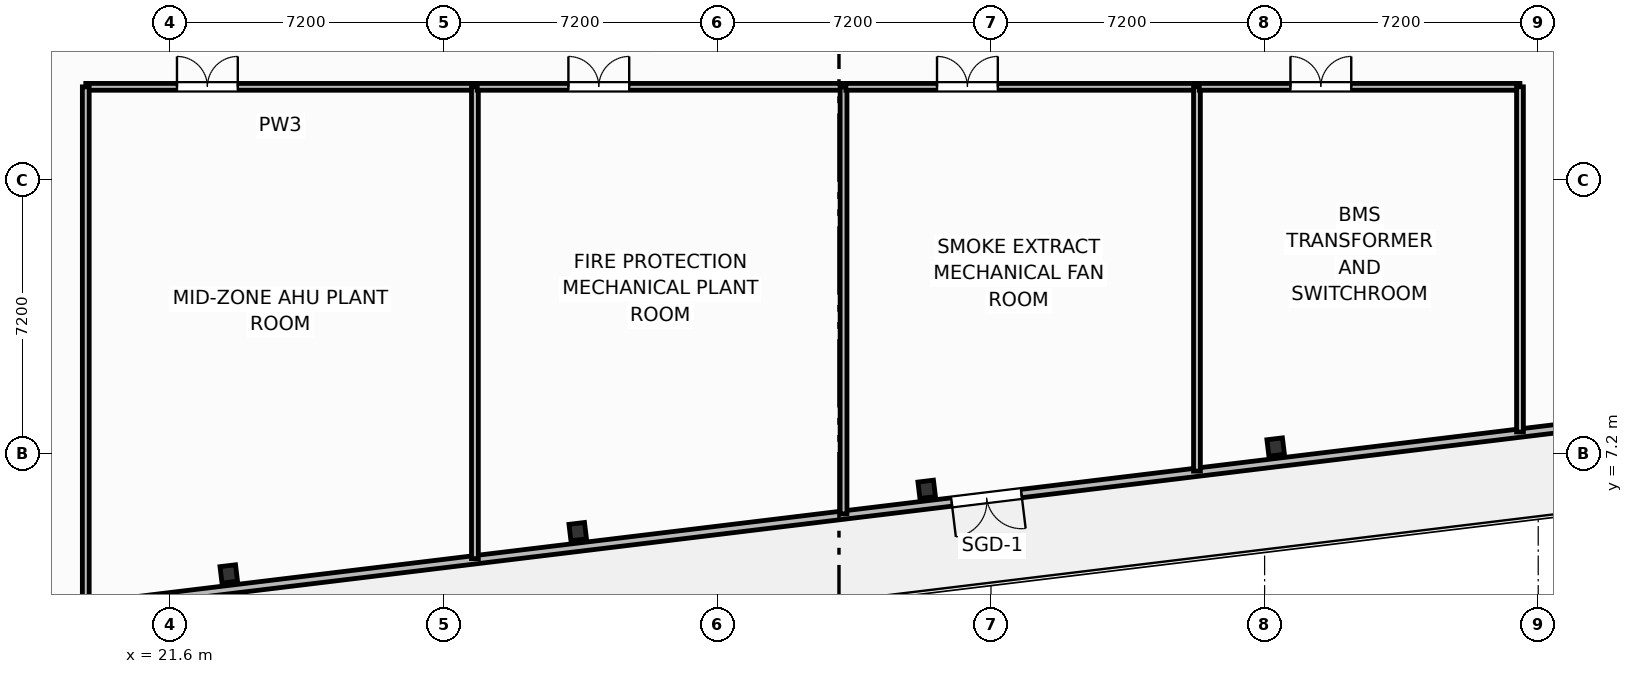
"""IFC4 building model, lengths in metres.
Left out: names, types, materials, properties, quantities, classifications, styles, units other than length and angle.
Written with IfcOpenShell. Run it as: python <this file> out.ifc"""

import sys

from ifc_helpers import new_model, si_unit, direction, frame, frame_2d, origin, origin_2d, place, context, subcontext, project, spatial, rectangle, i_section, extrude, element, fill, save


model = new_model("IFC4")
c1 = context("Model", 3, precision=1e-05, world=origin(), true_north=direction((0.0, 1.0)))
c2 = subcontext(c1, "Body", "Model", "MODEL_VIEW")
j1 = project(units=[si_unit("LENGTHUNIT", "METRE"), si_unit("PLANEANGLEUNIT", "RADIAN")], contexts=[c1])
p1 = place(None, origin())
s1 = spatial("IfcSite", under=j1, at=p1, CompositionType="ELEMENT")
p2 = place(p1, origin())
s2 = spatial("IfcBuilding", under=s1, at=p2, CompositionType="ELEMENT")
p3 = place(p2, frame((0.0, 0.0, 162.4)))
s3 = spatial("IfcBuildingStorey", under=s2, at=p3, CompositionType="ELEMENT", Elevation=162.4)
for number, where, z_axis, x_axis in (
    (1, (23.143, 4.033, -0.32), (0.0, 0.0, 1.0), (0.993, 0.12, 0.0)),
    (2, (32.325, 5.146, -0.32), (0.0, 0.0, 1.0), (0.993, 0.12, 0.0)),
    (3, (41.508, 6.26, -0.32), (0.0, 0.0, 1.0), (0.993, 0.12, 0.0)),
    (4, (50.691, 7.373, -0.32), (0.0, 0.0, 1.0), (0.993, 0.12, 0.0)),
):
    element("IfcColumn", number, at=place(p3, frame(where, z_axis=z_axis, x_axis=x_axis)), inside=s3, PredefinedType="COLUMN", context=c2, shape_type="SweptSolid", body=[
        extrude(i_section(OverallWidth=0.412, OverallDepth=0.435, WebThickness=0.036, FlangeThickness=0.057, FilletRadius=0.025, at=origin_2d()), origin(), (0.0, 0.0, 1.0), 5.12),
    ])
p4 = place(p3, frame((69.453, 9.234, 0.0), z_axis=(0.0, 0.0, 1.0), x_axis=(-0.99273203641, -0.120345768043, 0.0)))
e5 = element("IfcWall", 5, at=p4, inside=s3, PredefinedType="SOLIDWALL", context=c2, shape_type="SweptSolid", body=[
    extrude(rectangle(XDim=56.2, YDim=0.22, at=frame_2d((28.1, 0.0))), origin(), (0.0, 0.0, 1.0), 3.83),
])
p5 = place(p4, frame((25.639, 0.0, 0.0)))
e6 = element("IfcOpeningElement", 6, at=p5, cuts=e5, PredefinedType="OPENING", context=c2, shape_type="SweptSolid", body=[
    extrude(rectangle(XDim=1.85, YDim=2.3, at=frame_2d((0.925, 1.15))), frame((0.0, 0.12, 0.0), z_axis=(0.0, -1.0, 0.0), x_axis=(1.0, 0.0, 0.0)), (0.0, 0.0, 1.0), 0.24),
])
p6 = place(p4, frame((0.55, 0.0, 0.75)))
e7 = element("IfcOpeningElement", 7, at=p6, cuts=e5, PredefinedType="OPENING", context=c2, shape_type="SweptSolid", body=[
    extrude(rectangle(XDim=1.65, YDim=1.65, at=frame_2d((0.825, 0.825))), frame((0.0, 0.12, 0.0), z_axis=(0.0, -1.0, 0.0), x_axis=(1.0, 0.0, 0.0)), (0.0, 0.0, 1.0), 0.24),
])
p7 = place(p4, frame((54.0, 0.0, 0.75)))
e8 = element("IfcOpeningElement", 8, at=p7, cuts=e5, PredefinedType="OPENING", context=c2, shape_type="SweptSolid", body=[
    extrude(rectangle(XDim=1.65, YDim=1.65, at=frame_2d((0.825, 0.825))), frame((0.0, 0.12, 0.0), z_axis=(0.0, -1.0, 0.0), x_axis=(1.0, 0.0, 0.0)), (0.0, 0.0, 1.0), 0.24),
])
p8 = place(p3, frame((19.38, 16.85, 0.0), z_axis=(0.0, 0.0, 1.0), x_axis=(1.0, 0.0, 0.0)))
e9 = element("IfcWall", 9, at=p8, inside=s3, PredefinedType="PARTITIONING", context=c2, shape_type="SweptSolid", body=[
    extrude(rectangle(XDim=10.24, YDim=0.18, at=frame_2d((5.12, 0.0))), origin(), (0.0, 0.0, 1.0), 4.55),
])
p9 = place(p8, frame((2.4, 0.0, 0.0)))
e10 = element("IfcOpeningElement", 10, at=p9, cuts=e9, PredefinedType="OPENING", context=c2, shape_type="SweptSolid", body=[
    extrude(rectangle(XDim=1.6, YDim=2.05, at=frame_2d((0.8, 1.025))), frame((0.0, 0.1, 0.0), z_axis=(0.0, -1.0, 0.0), x_axis=(1.0, 0.0, 0.0)), (0.0, 0.0, 1.0), 0.2),
])
p10 = place(p3, frame((29.62, 4.436, 0.0), z_axis=(0.0, 0.0, 1.0), x_axis=(0.0, 1.0, 0.0)))
e11 = element("IfcWall", 11, at=p10, inside=s3, PredefinedType="PARTITIONING", context=c2, shape_type="SweptSolid", body=[
    extrude(rectangle(XDim=12.415, YDim=0.18, at=frame_2d((6.207, 0.0))), origin(), (0.0, 0.0, 1.0), 4.55),
])
p11 = place(p3, frame((19.38, 3.194, 0.0), z_axis=(0.0, 0.0, 1.0), x_axis=(0.0, 1.0, 0.0)))
e12 = element("IfcWall", 12, at=p11, inside=s3, PredefinedType="PARTITIONING", context=c2, shape_type="SweptSolid", body=[
    extrude(rectangle(XDim=13.656, YDim=0.18, at=frame_2d((6.828, 0.0))), origin(), (0.0, 0.0, 1.0), 4.55),
])
p12 = place(p3, frame((29.68, 16.85, 0.0), z_axis=(0.0, 0.0, 1.0), x_axis=(1.0, 0.0, 0.0)))
e13 = element("IfcWall", 13, at=p12, inside=s3, PredefinedType="PARTITIONING", context=c2, shape_type="SweptSolid", body=[
    extrude(rectangle(XDim=9.64, YDim=0.18, at=frame_2d((4.82, 0.0))), origin(), (0.0, 0.0, 1.0), 4.55),
])
p13 = place(p12, frame((2.4, 0.0, 0.0)))
e14 = element("IfcOpeningElement", 14, at=p13, cuts=e13, PredefinedType="OPENING", context=c2, shape_type="SweptSolid", body=[
    extrude(rectangle(XDim=1.6, YDim=2.05, at=frame_2d((0.8, 1.025))), frame((0.0, 0.1, 0.0), z_axis=(0.0, -1.0, 0.0), x_axis=(1.0, 0.0, 0.0)), (0.0, 0.0, 1.0), 0.2),
])
p14 = place(p3, frame((39.32, 5.611, 0.0), z_axis=(0.0, 0.0, 1.0), x_axis=(0.0, 1.0, 0.0)))
e15 = element("IfcWall", 15, at=p14, inside=s3, PredefinedType="PARTITIONING", context=c2, shape_type="SweptSolid", body=[
    extrude(rectangle(XDim=11.239, YDim=0.18, at=frame_2d((5.619, 0.0))), origin(), (0.0, 0.0, 1.0), 4.55),
])
p15 = place(p3, frame((39.38, 16.85, 0.0), z_axis=(0.0, 0.0, 1.0), x_axis=(1.0, 0.0, 0.0)))
e16 = element("IfcWall", 16, at=p15, inside=s3, PredefinedType="PARTITIONING", context=c2, shape_type="SweptSolid", body=[
    extrude(rectangle(XDim=9.24, YDim=0.18, at=frame_2d((4.62, 0.0))), origin(), (0.0, 0.0, 1.0), 4.55),
])
p16 = place(p15, frame((2.4, 0.0, 0.0)))
e17 = element("IfcOpeningElement", 17, at=p16, cuts=e16, PredefinedType="OPENING", context=c2, shape_type="SweptSolid", body=[
    extrude(rectangle(XDim=1.6, YDim=2.05, at=frame_2d((0.8, 1.025))), frame((0.0, 0.1, 0.0), z_axis=(0.0, -1.0, 0.0), x_axis=(1.0, 0.0, 0.0)), (0.0, 0.0, 1.0), 0.2),
])
p17 = place(p3, frame((48.62, 6.739, 0.0), z_axis=(0.0, 0.0, 1.0), x_axis=(0.0, 1.0, 0.0)))
e18 = element("IfcWall", 18, at=p17, inside=s3, PredefinedType="PARTITIONING", context=c2, shape_type="SweptSolid", body=[
    extrude(rectangle(XDim=10.111, YDim=0.18, at=frame_2d((5.056, 0.0))), origin(), (0.0, 0.0, 1.0), 4.55),
])
p18 = place(p3, frame((48.68, 16.85, 0.0), z_axis=(0.0, 0.0, 1.0), x_axis=(1.0, 0.0, 0.0)))
e19 = element("IfcWall", 19, at=p18, inside=s3, PredefinedType="PARTITIONING", context=c2, shape_type="SweptSolid", body=[
    extrude(rectangle(XDim=8.44, YDim=0.18, at=frame_2d((4.22, 0.0))), origin(), (0.0, 0.0, 1.0), 4.55),
])
p19 = place(p18, frame((2.4, 0.0, 0.0)))
e20 = element("IfcOpeningElement", 20, at=p19, cuts=e19, PredefinedType="OPENING", context=c2, shape_type="SweptSolid", body=[
    extrude(rectangle(XDim=1.6, YDim=2.05, at=frame_2d((0.8, 1.025))), frame((0.0, 0.1, 0.0), z_axis=(0.0, -1.0, 0.0), x_axis=(1.0, 0.0, 0.0)), (0.0, 0.0, 1.0), 0.2),
])
p20 = place(p3, frame((57.12, 7.769, 0.0), z_axis=(0.0, 0.0, 1.0), x_axis=(0.0, 1.0, 0.0)))
e21 = element("IfcWall", 21, at=p20, inside=s3, PredefinedType="PARTITIONING", context=c2, shape_type="SweptSolid", body=[
    extrude(rectangle(XDim=9.081, YDim=0.18, at=frame_2d((4.541, 0.0))), origin(), (0.0, 0.0, 1.0), 4.55),
])
p21 = place(p5, origin())
e22 = element("IfcDoor", 22, at=p21, inside=s3, OperationType="DOUBLE_DOOR_SINGLE_SWING", PredefinedType="DOOR", context=c2, shape_type="SweptSolid", body=[
    extrude(rectangle(XDim=1.85, YDim=2.3, at=frame_2d((0.925, 1.15))), frame((0.0, 0.025, 0.0), z_axis=(0.0, -1.0, 0.0), x_axis=(1.0, 0.0, 0.0)), (0.0, 0.0, 1.0), 0.05),
])
fill(e6, e22)
p22 = place(p9, origin())
e23 = element("IfcDoor", 23, at=p22, inside=s3, OperationType="DOUBLE_DOOR_SINGLE_SWING", PredefinedType="DOOR", context=c2, shape_type="SweptSolid", body=[
    extrude(rectangle(XDim=1.6, YDim=2.05, at=frame_2d((0.8, 1.025))), frame((0.0, 0.025, 0.0), z_axis=(0.0, -1.0, 0.0), x_axis=(1.0, 0.0, 0.0)), (0.0, 0.0, 1.0), 0.05),
])
fill(e10, e23)
p23 = place(p13, origin())
e24 = element("IfcDoor", 24, at=p23, inside=s3, OperationType="DOUBLE_DOOR_SINGLE_SWING", PredefinedType="DOOR", context=c2, shape_type="SweptSolid", body=[
    extrude(rectangle(XDim=1.6, YDim=2.05, at=frame_2d((0.8, 1.025))), frame((0.0, 0.025, 0.0), z_axis=(0.0, -1.0, 0.0), x_axis=(1.0, 0.0, 0.0)), (0.0, 0.0, 1.0), 0.05),
])
fill(e14, e24)
p24 = place(p16, origin())
e25 = element("IfcDoor", 25, at=p24, inside=s3, OperationType="DOUBLE_DOOR_SINGLE_SWING", PredefinedType="DOOR", context=c2, shape_type="SweptSolid", body=[
    extrude(rectangle(XDim=1.6, YDim=2.05, at=frame_2d((0.8, 1.025))), frame((0.0, 0.025, 0.0), z_axis=(0.0, -1.0, 0.0), x_axis=(1.0, 0.0, 0.0)), (0.0, 0.0, 1.0), 0.05),
])
fill(e17, e25)
p25 = place(p19, origin())
e26 = element("IfcDoor", 26, at=p25, inside=s3, OperationType="DOUBLE_DOOR_SINGLE_SWING", PredefinedType="DOOR", context=c2, shape_type="SweptSolid", body=[
    extrude(rectangle(XDim=1.6, YDim=2.05, at=frame_2d((0.8, 1.025))), frame((0.0, 0.025, 0.0), z_axis=(0.0, -1.0, 0.0), x_axis=(1.0, 0.0, 0.0)), (0.0, 0.0, 1.0), 0.05),
])
fill(e20, e26)
save(model, sys.argv[1])
